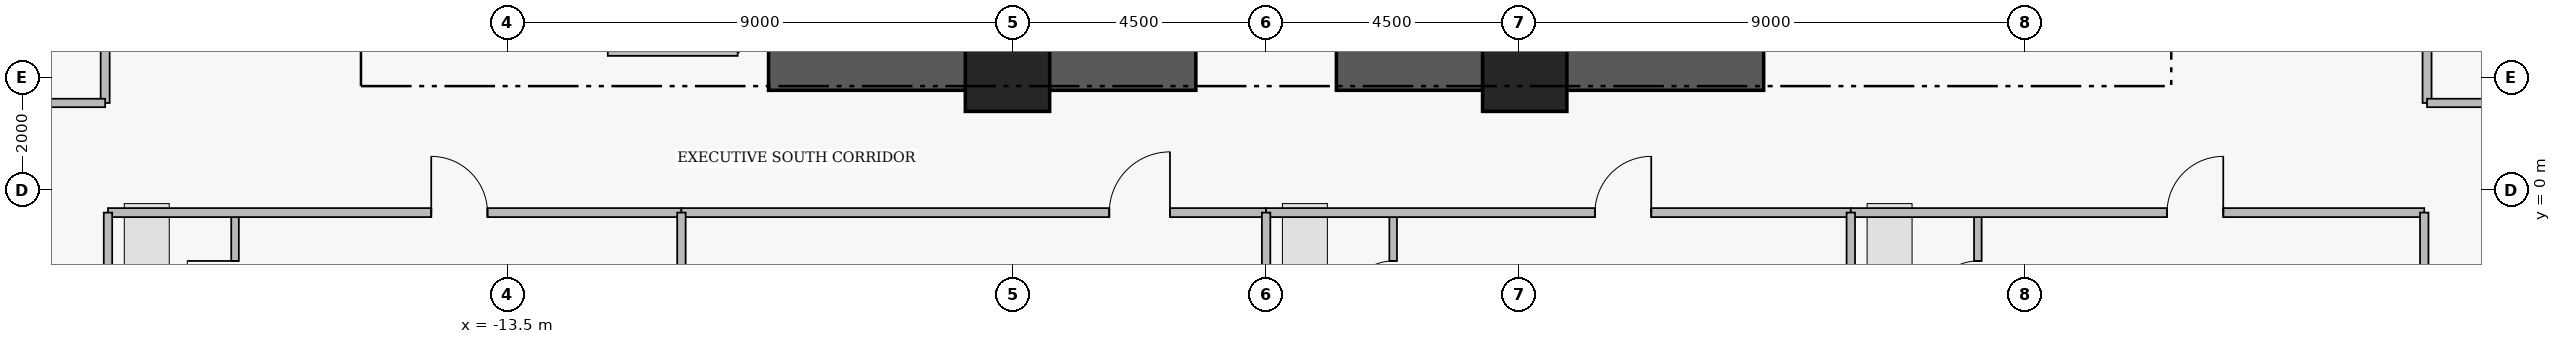
"""IFC4 building model, lengths in metres.
Left out: names, types, materials, properties, quantities, classifications, styles, units other than length and angle.
Written with IfcOpenShell. Run it as: python <this file> out.ifc"""

import sys

from ifc_helpers import new_model, si_unit, direction, frame, frame_2d, origin, origin_2d, place, context, subcontext, project, spatial, rectangle, extrude, element, fill, save


model = new_model("IFC4")
c1 = context("Model", 3, precision=1e-05, world=origin(), true_north=direction((0.0, 1.0)))
c2 = subcontext(c1, "Body", "Model", "MODEL_VIEW")
j1 = project(units=[si_unit("LENGTHUNIT", "METRE"), si_unit("PLANEANGLEUNIT", "RADIAN")], contexts=[c1])
p1 = place(None, origin())
s1 = spatial("IfcSite", under=j1, at=p1, CompositionType="ELEMENT")
p2 = place(p1, origin())
s2 = spatial("IfcBuilding", under=s1, at=p2, CompositionType="ELEMENT")
p3 = place(p2, frame((0.0, 0.0, 128.5)))
s3 = spatial("IfcBuildingStorey", under=s2, at=p3, CompositionType="ELEMENT", Elevation=128.5)
for number, where, z_axis, x_axis in (
    (1, (-8.85, 2.15, 0.0), (0.0, 0.0, 1.0), (1.0, 0.0, 0.0)),
    (2, (1.25, 2.15, 0.0), (0.0, 0.0, 1.0), (1.0, 0.0, 0.0)),
):
    element("IfcWall", number, at=place(p3, frame(where, z_axis=z_axis, x_axis=x_axis)), inside=s3, PredefinedType="SHEAR", context=c2, shape_type="SweptSolid", body=[
        extrude(rectangle(XDim=7.6, YDim=0.75, at=frame_2d((3.8, 0.0))), origin(), (0.0, 0.0, 1.0), 3.43),
    ])
for number, where, z_axis, x_axis in (
    (3, (-4.6, 2.15, 0.0), (0.0, 0.0, 1.0), (1.0, 0.0, 0.0)),
    (4, (4.6, 2.15, 0.0), (0.0, 0.0, 1.0), (1.0, 0.0, 0.0)),
):
    element("IfcColumn", number, at=place(p3, frame(where, z_axis=z_axis, x_axis=x_axis)), inside=s3, PredefinedType="COLUMN", context=c2, shape_type="SweptSolid", body=[
        extrude(rectangle(XDim=1.5, YDim=1.5, at=origin_2d()), origin(), (0.0, 0.0, 1.0), 3.65),
    ])
p4 = place(p3, frame((-18.34, -2.76, 0.0), z_axis=(0.0, 0.0, 1.0), x_axis=(0.0, 1.0, 0.0)))
e5 = element("IfcWall", 5, at=p4, inside=s3, PredefinedType="PLUMBINGWALL", context=c2, shape_type="SweptSolid", body=[
    extrude(rectangle(XDim=2.36, YDim=0.135, at=frame_2d((1.18, 0.0))), origin(), (0.0, 0.0, 1.0), 3.43),
])
p5 = place(p4, frame((0.65, 0.0, 0.0)))
e6 = element("IfcOpeningElement", 6, at=p5, cuts=e5, PredefinedType="OPENING", context=c2, shape_type="SweptSolid", body=[
    extrude(rectangle(XDim=0.85, YDim=2.1, at=frame_2d((0.425, 1.05))), frame((0.0, 0.077, 0.0), z_axis=(0.0, -1.0, 0.0), x_axis=(1.0, 0.0, 0.0)), (0.0, 0.0, 1.0), 0.155),
])
p6 = place(p3, frame((-20.6, -0.4, 0.0), z_axis=(0.0, 0.0, 1.0), x_axis=(1.0, 0.0, 0.0)))
e7 = element("IfcWall", 7, at=p6, inside=s3, PredefinedType="PARTITIONING", context=c2, shape_type="SweptSolid", body=[
    extrude(rectangle(XDim=10.2, YDim=0.16, at=frame_2d((5.1, 0.0))), origin(), (0.0, 0.0, 1.0), 3.43),
])
p7 = place(p6, frame((5.75, 0.0, 0.0)))
e8 = element("IfcOpeningElement", 8, at=p7, cuts=e7, PredefinedType="OPENING", context=c2, shape_type="SweptSolid", body=[
    extrude(rectangle(XDim=1.0, YDim=2.15, at=frame_2d((0.5, 1.075))), frame((0.0, 0.09, 0.0), z_axis=(0.0, -1.0, 0.0), x_axis=(1.0, 0.0, 0.0)), (0.0, 0.0, 1.0), 0.18),
])
p8 = place(p3, frame((-10.4, -0.4, 0.0), z_axis=(0.0, 0.0, 1.0), x_axis=(1.0, 0.0, 0.0)))
e9 = element("IfcWall", 9, at=p8, inside=s3, PredefinedType="PARTITIONING", context=c2, shape_type="SweptSolid", body=[
    extrude(rectangle(XDim=10.4, YDim=0.16, at=frame_2d((5.2, 0.0))), origin(), (0.0, 0.0, 1.0), 3.43),
])
p9 = place(p8, frame((7.61, 0.0, 0.0)))
e10 = element("IfcOpeningElement", 10, at=p9, cuts=e9, PredefinedType="OPENING", context=c2, shape_type="SweptSolid", body=[
    extrude(rectangle(XDim=1.08, YDim=2.18, at=frame_2d((0.54, 1.09))), frame((0.0, 0.09, 0.0), z_axis=(0.0, -1.0, 0.0), x_axis=(1.0, 0.0, 0.0)), (0.0, 0.0, 1.0), 0.18),
])
p10 = place(p3, frame((2.26, -2.76, 0.0), z_axis=(0.0, 0.0, 1.0), x_axis=(0.0, 1.0, 0.0)))
e11 = element("IfcWall", 11, at=p10, inside=s3, PredefinedType="PLUMBINGWALL", context=c2, shape_type="SweptSolid", body=[
    extrude(rectangle(XDim=2.36, YDim=0.135, at=frame_2d((1.18, 0.0))), origin(), (0.0, 0.0, 1.0), 3.43),
])
p11 = place(p10, frame((0.65, 0.0, 0.0)))
e12 = element("IfcOpeningElement", 12, at=p11, cuts=e11, PredefinedType="OPENING", context=c2, shape_type="SweptSolid", body=[
    extrude(rectangle(XDim=0.85, YDim=2.1, at=frame_2d((0.425, 1.05))), frame((0.0, 0.077, 0.0), z_axis=(0.0, -1.0, 0.0), x_axis=(1.0, 0.0, 0.0)), (0.0, 0.0, 1.0), 0.155),
])
p12 = place(p3, frame((0.0, -0.4, 0.0), z_axis=(0.0, 0.0, 1.0), x_axis=(1.0, 0.0, 0.0)))
e13 = element("IfcWall", 13, at=p12, inside=s3, PredefinedType="PARTITIONING", context=c2, shape_type="SweptSolid", body=[
    extrude(rectangle(XDim=10.4, YDim=0.16, at=frame_2d((5.2, 0.0))), origin(), (0.0, 0.0, 1.0), 3.43),
])
p13 = place(p12, frame((5.85, 0.0, 0.0)))
e14 = element("IfcOpeningElement", 14, at=p13, cuts=e13, PredefinedType="OPENING", context=c2, shape_type="SweptSolid", body=[
    extrude(rectangle(XDim=1.0, YDim=2.15, at=frame_2d((0.5, 1.075))), frame((0.0, 0.09, 0.0), z_axis=(0.0, -1.0, 0.0), x_axis=(1.0, 0.0, 0.0)), (0.0, 0.0, 1.0), 0.18),
])
p14 = place(p3, frame((12.66, -2.76, 0.0), z_axis=(0.0, 0.0, 1.0), x_axis=(0.0, 1.0, 0.0)))
e15 = element("IfcWall", 15, at=p14, inside=s3, PredefinedType="PLUMBINGWALL", context=c2, shape_type="SweptSolid", body=[
    extrude(rectangle(XDim=2.36, YDim=0.135, at=frame_2d((1.18, 0.0))), origin(), (0.0, 0.0, 1.0), 3.43),
])
p15 = place(p14, frame((0.65, 0.0, 0.0)))
e16 = element("IfcOpeningElement", 16, at=p15, cuts=e15, PredefinedType="OPENING", context=c2, shape_type="SweptSolid", body=[
    extrude(rectangle(XDim=0.85, YDim=2.1, at=frame_2d((0.425, 1.05))), frame((0.0, 0.077, 0.0), z_axis=(0.0, -1.0, 0.0), x_axis=(1.0, 0.0, 0.0)), (0.0, 0.0, 1.0), 0.155),
])
p16 = place(p3, frame((10.4, -0.4, 0.0), z_axis=(0.0, 0.0, 1.0), x_axis=(1.0, 0.0, 0.0)))
e17 = element("IfcWall", 17, at=p16, inside=s3, PredefinedType="PARTITIONING", context=c2, shape_type="SweptSolid", body=[
    extrude(rectangle(XDim=10.2, YDim=0.16, at=frame_2d((5.1, 0.0))), origin(), (0.0, 0.0, 1.0), 3.43),
])
p17 = place(p16, frame((5.625, 0.0, 0.0)))
e18 = element("IfcOpeningElement", 18, at=p17, cuts=e17, PredefinedType="OPENING", context=c2, shape_type="SweptSolid", body=[
    extrude(rectangle(XDim=1.0, YDim=2.15, at=frame_2d((0.5, 1.075))), frame((0.0, 0.09, 0.0), z_axis=(0.0, -1.0, 0.0), x_axis=(1.0, 0.0, 0.0)), (0.0, 0.0, 1.0), 0.18),
])
p18 = place(p3, frame((20.65, 1.55, 0.0), z_axis=(0.0, 0.0, 1.0), x_axis=(0.0, 1.0, 0.0)))
e19 = element("IfcWall", 19, at=p18, inside=s3, PredefinedType="PARTITIONING", context=c2, shape_type="SweptSolid", body=[
    extrude(rectangle(XDim=6.25, YDim=0.16, at=frame_2d((3.125, 0.0))), origin(), (0.0, 0.0, 1.0), 3.43),
])
p19 = place(p18, frame((2.665, 0.0, 0.0)))
e20 = element("IfcOpeningElement", 20, at=p19, cuts=e19, PredefinedType="OPENING", context=c2, shape_type="SweptSolid", body=[
    extrude(rectangle(XDim=0.92, YDim=2.12, at=frame_2d((0.46, 1.06))), frame((0.0, 0.09, 0.0), z_axis=(0.0, -1.0, 0.0), x_axis=(1.0, 0.0, 0.0)), (0.0, 0.0, 1.0), 0.18),
])
p20 = place(p3, frame((-20.65, 1.55, 0.0), z_axis=(0.0, 0.0, 1.0), x_axis=(0.0, 1.0, 0.0)))
e21 = element("IfcWall", 21, at=p20, inside=s3, PredefinedType="PARTITIONING", context=c2, shape_type="SweptSolid", body=[
    extrude(rectangle(XDim=13.3, YDim=0.16, at=frame_2d((6.65, 0.0))), origin(), (0.0, 0.0, 1.0), 3.43),
])
p21 = place(p20, frame((6.175, 0.0, 0.0)))
e22 = element("IfcOpeningElement", 22, at=p21, cuts=e21, PredefinedType="OPENING", context=c2, shape_type="SweptSolid", body=[
    extrude(rectangle(XDim=0.95, YDim=2.15, at=frame_2d((0.475, 1.075))), frame((0.0, 0.09, 0.0), z_axis=(0.0, -1.0, 0.0), x_axis=(1.0, 0.0, 0.0)), (0.0, 0.0, 1.0), 0.18),
])
p22 = place(p3, frame((-11.71, 2.47, 0.0), z_axis=(0.0, 0.0, 1.0), x_axis=(1.0, 0.0, 0.0)))
e23 = element("IfcWall", 23, at=p22, inside=s3, PredefinedType="PARTITIONING", context=c2, shape_type="SweptSolid", body=[
    extrude(rectangle(XDim=2.31, YDim=0.165, at=frame_2d((1.155, 0.0))), origin(), (0.0, 0.0, 1.0), 2.03),
])
p23 = place(p3, frame((-20.6, -11.9, 0.0), z_axis=(0.0, 0.0, 1.0), x_axis=(0.0, 1.0, 0.0)))
e24 = element("IfcWall", 24, at=p23, inside=s3, PredefinedType="PARTITIONING", context=c2, shape_type="SweptSolid", body=[
    extrude(rectangle(XDim=11.5, YDim=0.15, at=frame_2d((5.75, 0.0))), origin(), (0.0, 0.0, 1.0), 3.43),
])
p24 = place(p3, frame((-10.4, -15.32, 0.0), z_axis=(0.0, 0.0, 1.0), x_axis=(0.0, 1.0, 0.0)))
e25 = element("IfcWall", 25, at=p24, inside=s3, PredefinedType="PARTITIONING", context=c2, shape_type="SweptSolid", body=[
    extrude(rectangle(XDim=14.92, YDim=0.15, at=frame_2d((7.46, 0.0))), origin(), (0.0, 0.0, 1.0), 3.43),
])
p25 = place(p3, frame((0.0, -15.34, 0.0), z_axis=(0.0, 0.0, 1.0), x_axis=(0.0, 1.0, 0.0)))
e26 = element("IfcWall", 26, at=p25, inside=s3, PredefinedType="PARTITIONING", context=c2, shape_type="SweptSolid", body=[
    extrude(rectangle(XDim=14.94, YDim=0.15, at=frame_2d((7.47, 0.0))), origin(), (0.0, 0.0, 1.0), 3.43),
])
p26 = place(p3, frame((10.4, -15.32, 0.0), z_axis=(0.0, 0.0, 1.0), x_axis=(0.0, 1.0, 0.0)))
e27 = element("IfcWall", 27, at=p26, inside=s3, PredefinedType="PARTITIONING", context=c2, shape_type="SweptSolid", body=[
    extrude(rectangle(XDim=14.92, YDim=0.15, at=frame_2d((7.46, 0.0))), origin(), (0.0, 0.0, 1.0), 3.43),
])
p27 = place(p3, frame((20.6, -11.9, 0.0), z_axis=(0.0, 0.0, 1.0), x_axis=(0.0, 1.0, 0.0)))
e28 = element("IfcWall", 28, at=p27, inside=s3, PredefinedType="PARTITIONING", context=c2, shape_type="SweptSolid", body=[
    extrude(rectangle(XDim=11.5, YDim=0.15, at=frame_2d((5.75, 0.0))), origin(), (0.0, 0.0, 1.0), 3.43),
])
for number, where, z_axis, x_axis in (
    (29, (20.65, 1.55, 0.0), (0.0, 0.0, 1.0), (1.0, 0.0, 0.0)),
    (30, (-23.867, 1.55, 0.0), (0.0, 0.0, 1.0), (1.0, 0.0, 0.0)),
):
    element("IfcWall", number, at=place(p3, frame(where, z_axis=z_axis, x_axis=x_axis)), inside=s3, PredefinedType="PARTITIONING", context=c2, shape_type="SweptSolid", body=[
        extrude(rectangle(XDim=3.217, YDim=0.15, at=frame_2d((1.608, 0.0))), origin(), (0.0, 0.0, 1.0), 3.43),
    ])
p28 = place(p5, origin())
e31 = element("IfcDoor", 31, at=p28, inside=s3, OperationType="SINGLE_SWING_RIGHT", PredefinedType="DOOR", context=c2, shape_type="SweptSolid", body=[
    extrude(rectangle(XDim=0.85, YDim=2.1, at=frame_2d((0.425, 1.05))), frame((0.0, 0.025, 0.0), z_axis=(0.0, -1.0, 0.0), x_axis=(1.0, 0.0, 0.0)), (0.0, 0.0, 1.0), 0.05),
])
fill(e6, e31)
p29 = place(p7, origin())
e32 = element("IfcDoor", 32, at=p29, inside=s3, OperationType="SINGLE_SWING_LEFT", PredefinedType="DOOR", context=c2, shape_type="SweptSolid", body=[
    extrude(rectangle(XDim=1.0, YDim=2.15, at=frame_2d((0.5, 1.075))), frame((0.0, 0.025, 0.0), z_axis=(0.0, -1.0, 0.0), x_axis=(1.0, 0.0, 0.0)), (0.0, 0.0, 1.0), 0.05),
])
fill(e8, e32)
p30 = place(p9, origin())
e33 = element("IfcDoor", 33, at=p30, inside=s3, OperationType="SINGLE_SWING_RIGHT", PredefinedType="DOOR", context=c2, shape_type="SweptSolid", body=[
    extrude(rectangle(XDim=1.08, YDim=2.18, at=frame_2d((0.54, 1.09))), frame((0.0, 0.025, 0.0), z_axis=(0.0, -1.0, 0.0), x_axis=(1.0, 0.0, 0.0)), (0.0, 0.0, 1.0), 0.05),
])
fill(e10, e33)
p31 = place(p11, origin())
e34 = element("IfcDoor", 34, at=p31, inside=s3, OperationType="SINGLE_SWING_LEFT", PredefinedType="DOOR", context=c2, shape_type="SweptSolid", body=[
    extrude(rectangle(XDim=0.85, YDim=2.1, at=frame_2d((0.425, 1.05))), frame((0.0, 0.025, 0.0), z_axis=(0.0, -1.0, 0.0), x_axis=(1.0, 0.0, 0.0)), (0.0, 0.0, 1.0), 0.05),
])
fill(e12, e34)
p32 = place(p13, origin())
e35 = element("IfcDoor", 35, at=p32, inside=s3, OperationType="SINGLE_SWING_RIGHT", PredefinedType="DOOR", context=c2, shape_type="SweptSolid", body=[
    extrude(rectangle(XDim=1.0, YDim=2.15, at=frame_2d((0.5, 1.075))), frame((0.0, 0.025, 0.0), z_axis=(0.0, -1.0, 0.0), x_axis=(1.0, 0.0, 0.0)), (0.0, 0.0, 1.0), 0.05),
])
fill(e14, e35)
p33 = place(p15, origin())
e36 = element("IfcDoor", 36, at=p33, inside=s3, OperationType="SINGLE_SWING_LEFT", PredefinedType="DOOR", context=c2, shape_type="SweptSolid", body=[
    extrude(rectangle(XDim=0.85, YDim=2.1, at=frame_2d((0.425, 1.05))), frame((0.0, 0.025, 0.0), z_axis=(0.0, -1.0, 0.0), x_axis=(1.0, 0.0, 0.0)), (0.0, 0.0, 1.0), 0.05),
])
fill(e16, e36)
p34 = place(p17, origin())
e37 = element("IfcDoor", 37, at=p34, inside=s3, OperationType="SINGLE_SWING_RIGHT", PredefinedType="DOOR", context=c2, shape_type="SweptSolid", body=[
    extrude(rectangle(XDim=1.0, YDim=2.15, at=frame_2d((0.5, 1.075))), frame((0.0, 0.025, 0.0), z_axis=(0.0, -1.0, 0.0), x_axis=(1.0, 0.0, 0.0)), (0.0, 0.0, 1.0), 0.05),
])
fill(e18, e37)
save(model, sys.argv[1])
